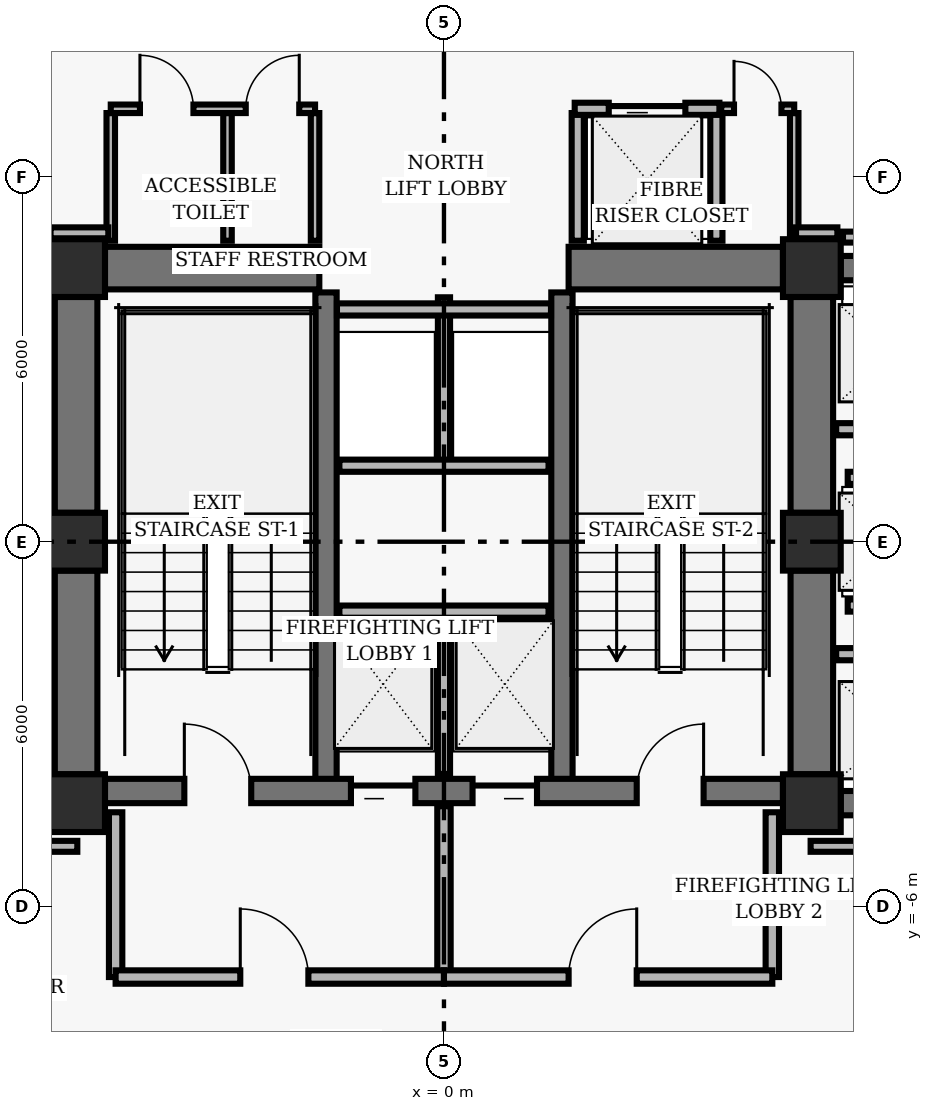
"""IFC4 building model, lengths in metres.
Left out: names, types, materials, properties, quantities, classifications, styles, units other than length and angle.
Written with IfcOpenShell. Run it as: python <this file> out.ifc"""

import sys

from ifc_helpers import new_model, si_unit, direction, frame, frame_2d, origin, origin_2d, place, context, subcontext, project, spatial, rectangle, hollow_rectangle, extrude, element, fill, save


model = new_model("IFC4")
c1 = context("Model", 3, precision=1e-05, world=origin(), true_north=direction((0.0, 1.0)))
c2 = subcontext(c1, "Body", "Model", "MODEL_VIEW")
j1 = project(units=[si_unit("LENGTHUNIT", "METRE"), si_unit("PLANEANGLEUNIT", "RADIAN")], contexts=[c1])
p1 = place(None, origin())
s1 = spatial("IfcSite", under=j1, at=p1, CompositionType="ELEMENT")
p2 = place(p1, origin())
s2 = spatial("IfcBuilding", under=s1, at=p2, CompositionType="ELEMENT")
p3 = place(p2, frame((0.0, 0.0, 97.76)))
s3 = spatial("IfcBuildingStorey", under=s2, at=p3, CompositionType="ELEMENT", Elevation=97.76)
for number, where, z_axis, x_axis in (
    (1, (-6.05, 4.5, 0.0), (0.0, 0.0, 1.0), (1.0, 0.0, 0.0)),
    (2, (6.05, 4.5, 0.0), (0.0, 0.0, 1.0), (1.0, 0.0, 0.0)),
    (3, (-6.05, 0.0, 0.0), (0.0, 0.0, 1.0), (1.0, 0.0, 0.0)),
    (4, (6.05, 0.0, 0.0), (0.0, 0.0, 1.0), (1.0, 0.0, 0.0)),
    (5, (-6.05, -4.3, 0.0), (0.0, 0.0, 1.0), (1.0, 0.0, 0.0)),
    (6, (6.05, -4.3, 0.0), (0.0, 0.0, 1.0), (1.0, 0.0, 0.0)),
):
    element("IfcColumn", number, at=place(p3, frame(where, z_axis=z_axis, x_axis=x_axis)), inside=s3, PredefinedType="COLUMN", context=c2, shape_type="SweptSolid", body=[
        extrude(hollow_rectangle(XDim=0.95, YDim=0.95, WallThickness=0.06, InnerFilletRadius=0.02, OuterFilletRadius=0.04, at=origin_2d()), origin(), (0.0, 0.0, 1.0), 3.04),
    ])
p4 = place(p3, frame((-6.05, 0.475, 0.0), z_axis=(0.0, 0.0, 1.0), x_axis=(0.0, 1.0, 0.0)))
e7 = element("IfcWall", 7, at=p4, inside=s3, PredefinedType="SHEAR", context=c2, shape_type="SweptSolid", body=[
    extrude(rectangle(XDim=3.55, YDim=0.7, at=frame_2d((1.775, 0.0))), origin(), (0.0, 0.0, 1.0), 2.718),
])
p5 = place(p3, frame((-6.05, -3.825, 0.0), z_axis=(0.0, 0.0, 1.0), x_axis=(0.0, 1.0, 0.0)))
e8 = element("IfcWall", 8, at=p5, inside=s3, PredefinedType="SHEAR", context=c2, shape_type="SweptSolid", body=[
    extrude(rectangle(XDim=3.35, YDim=0.7, at=frame_2d((1.675, 0.0))), origin(), (0.0, 0.0, 1.0), 2.718),
])
p6 = place(p3, frame((6.05, 0.475, 0.0), z_axis=(0.0, 0.0, 1.0), x_axis=(0.0, 1.0, 0.0)))
e9 = element("IfcWall", 9, at=p6, inside=s3, PredefinedType="SHEAR", context=c2, shape_type="SweptSolid", body=[
    extrude(rectangle(XDim=3.55, YDim=0.7, at=frame_2d((1.775, 0.0))), origin(), (0.0, 0.0, 1.0), 2.718),
])
p7 = place(p3, frame((6.05, -3.825, 0.0), z_axis=(0.0, 0.0, 1.0), x_axis=(0.0, 1.0, 0.0)))
e10 = element("IfcWall", 10, at=p7, inside=s3, PredefinedType="SHEAR", context=c2, shape_type="SweptSolid", body=[
    extrude(rectangle(XDim=3.35, YDim=0.7, at=frame_2d((1.675, 0.0))), origin(), (0.0, 0.0, 1.0), 2.718),
])
for number, where, z_axis, x_axis in (
    (11, (-1.94, -4.1, 0.0), (0.0, 0.0, 1.0), (0.0, 1.0, 0.0)),
    (12, (1.94, -4.1, 0.0), (0.0, 0.0, 1.0), (0.0, 1.0, 0.0)),
):
    element("IfcWall", number, at=place(p3, frame(where, z_axis=z_axis, x_axis=x_axis)), inside=s3, PredefinedType="SHEAR", context=c2, shape_type="SweptSolid", body=[
        extrude(rectangle(XDim=8.2, YDim=0.35, at=frame_2d((4.1, 0.0))), origin(), (0.0, 0.0, 1.0), 2.718),
    ])
p8 = place(p3, frame((-5.575, -4.1, 0.0), z_axis=(0.0, 0.0, 1.0), x_axis=(1.0, 0.0, 0.0)))
e13 = element("IfcWall", 13, at=p8, inside=s3, PredefinedType="SHEAR", context=c2, shape_type="SweptSolid", body=[
    extrude(rectangle(XDim=11.15, YDim=0.4, at=frame_2d((5.575, 0.0))), origin(), (0.0, 0.0, 1.0), 2.718),
])
p9 = place(p8, frame((1.305, 0.0, 0.0)))
e14 = element("IfcOpeningElement", 14, at=p9, cuts=e13, PredefinedType="OPENING", context=c2, shape_type="SweptSolid", body=[
    extrude(rectangle(XDim=1.1, YDim=2.04, at=frame_2d((0.55, 1.02))), frame((0.0, 0.21, 0.0), z_axis=(0.0, -1.0, 0.0), x_axis=(1.0, 0.0, 0.0)), (0.0, 0.0, 1.0), 0.42),
])
p10 = place(p8, frame((8.745, 0.0, 0.0)))
e15 = element("IfcOpeningElement", 15, at=p10, cuts=e13, PredefinedType="OPENING", context=c2, shape_type="SweptSolid", body=[
    extrude(rectangle(XDim=1.1, YDim=2.04, at=frame_2d((0.55, 1.02))), frame((0.0, 0.21, 0.0), z_axis=(0.0, -1.0, 0.0), x_axis=(1.0, 0.0, 0.0)), (0.0, 0.0, 1.0), 0.42),
])
p11 = place(p8, frame((4.045, 0.0, 0.0)))
e16 = element("IfcOpeningElement", 16, at=p11, cuts=e13, PredefinedType="OPENING", context=c2, shape_type="SweptSolid", body=[
    extrude(rectangle(XDim=1.06, YDim=2.04, at=frame_2d((0.53, 1.02))), frame((0.0, 0.21, 0.0), z_axis=(0.0, -1.0, 0.0), x_axis=(1.0, 0.0, 0.0)), (0.0, 0.0, 1.0), 0.42),
])
p12 = place(p8, frame((6.045, 0.0, 0.0)))
e17 = element("IfcOpeningElement", 17, at=p12, cuts=e13, PredefinedType="OPENING", context=c2, shape_type="SweptSolid", body=[
    extrude(rectangle(XDim=1.06, YDim=2.04, at=frame_2d((0.53, 1.02))), frame((0.0, 0.21, 0.0), z_axis=(0.0, -1.0, 0.0), x_axis=(1.0, 0.0, 0.0)), (0.0, 0.0, 1.0), 0.42),
])
for number, where, z_axis, x_axis in (
    (18, (-5.575, 4.5, 0.0), (0.0, 0.0, 1.0), (1.0, 0.0, 0.0)),
    (19, (2.05, 4.5, 0.0), (0.0, 0.0, 1.0), (1.0, 0.0, 0.0)),
):
    element("IfcWall", number, at=place(p3, frame(where, z_axis=z_axis, x_axis=x_axis)), inside=s3, PredefinedType="SHEAR", context=c2, shape_type="SweptSolid", body=[
        extrude(rectangle(XDim=3.525, YDim=0.7, at=frame_2d((1.762, 0.0))), origin(), (0.0, 0.0, 1.0), 2.718),
    ])
for number, where, z_axis, x_axis in (
    (20, (6.525, 4.5, 0.0), (0.0, 0.0, 1.0), (1.0, 0.0, 0.0)),
    (21, (6.525, -4.3, 0.0), (0.0, 0.0, 1.0), (1.0, 0.0, 0.0)),
):
    element("IfcWall", number, at=place(p3, frame(where, z_axis=z_axis, x_axis=x_axis)), inside=s3, PredefinedType="SHEAR", context=c2, shape_type="SweptSolid", body=[
        extrude(rectangle(XDim=1.95, YDim=0.4, at=frame_2d((0.975, 0.0))), origin(), (0.0, 0.0, 1.0), 2.718),
    ])
p13 = place(p3, frame((0.0, -3.82, 0.0), z_axis=(0.0, 0.0, 1.0), x_axis=(0.0, 1.0, 0.0)))
e22 = element("IfcWall", 22, at=p13, inside=s3, PredefinedType="PARTITIONING", context=c2, shape_type="SweptSolid", body=[
    extrude(rectangle(XDim=2.67, YDim=0.2, at=frame_2d((1.335, 0.0))), origin(), (0.0, 0.0, 1.0), 2.693),
])
p14 = place(p3, frame((-1.72, -1.15, 0.0), z_axis=(0.0, 0.0, 1.0), x_axis=(1.0, 0.0, 0.0)))
e23 = element("IfcWall", 23, at=p14, inside=s3, PredefinedType="PARTITIONING", context=c2, shape_type="SweptSolid", body=[
    extrude(rectangle(XDim=3.44, YDim=0.2, at=frame_2d((1.72, 0.0))), origin(), (0.0, 0.0, 1.0), 2.693),
])
for number, where, z_axis, x_axis in (
    (24, (-5.4, -7.16, 0.0), (0.0, 0.0, 1.0), (0.0, 1.0, 0.0)),
    (25, (5.4, -7.16, 0.0), (0.0, 0.0, 1.0), (0.0, 1.0, 0.0)),
):
    element("IfcWall", number, at=place(p3, frame(where, z_axis=z_axis, x_axis=x_axis)), inside=s3, PredefinedType="PARTITIONING", context=c2, shape_type="SweptSolid", body=[
        extrude(rectangle(XDim=2.71, YDim=0.22, at=frame_2d((1.355, 0.0))), origin(), (0.0, 0.0, 1.0), 2.693),
    ])
p15 = place(p3, frame((0.0, -7.16, 0.0), z_axis=(0.0, 0.0, 1.0), x_axis=(0.0, 1.0, 0.0)))
e26 = element("IfcWall", 26, at=p15, inside=s3, PredefinedType="PARTITIONING", context=c2, shape_type="SweptSolid", body=[
    extrude(rectangle(XDim=2.81, YDim=0.22, at=frame_2d((1.405, 0.0))), origin(), (0.0, 0.0, 1.0), 2.693),
])
p16 = place(p3, frame((-5.4, -7.16, 0.0), z_axis=(0.0, 0.0, 1.0), x_axis=(1.0, 0.0, 0.0)))
e27 = element("IfcWall", 27, at=p16, inside=s3, PredefinedType="PARTITIONING", context=c2, shape_type="SweptSolid", body=[
    extrude(rectangle(XDim=5.4, YDim=0.22, at=frame_2d((2.7, 0.0))), origin(), (0.0, 0.0, 1.0), 2.693),
])
p17 = place(p16, frame((2.05, 0.0, 0.0)))
e28 = element("IfcOpeningElement", 28, at=p17, cuts=e27, PredefinedType="OPENING", context=c2, shape_type="SweptSolid", body=[
    extrude(rectangle(XDim=1.12, YDim=2.02, at=frame_2d((0.56, 1.01))), frame((0.0, 0.12, 0.0), z_axis=(0.0, -1.0, 0.0), x_axis=(1.0, 0.0, 0.0)), (0.0, 0.0, 1.0), 0.24),
])
p18 = place(p3, frame((0.0, -7.16, 0.0), z_axis=(0.0, 0.0, 1.0), x_axis=(1.0, 0.0, 0.0)))
e29 = element("IfcWall", 29, at=p18, inside=s3, PredefinedType="PARTITIONING", context=c2, shape_type="SweptSolid", body=[
    extrude(rectangle(XDim=5.4, YDim=0.22, at=frame_2d((2.7, 0.0))), origin(), (0.0, 0.0, 1.0), 2.693),
])
p19 = place(p18, frame((2.05, 0.0, 0.0)))
e30 = element("IfcOpeningElement", 30, at=p19, cuts=e29, PredefinedType="OPENING", context=c2, shape_type="SweptSolid", body=[
    extrude(rectangle(XDim=1.12, YDim=2.02, at=frame_2d((0.56, 1.01))), frame((0.0, 0.12, 0.0), z_axis=(0.0, -1.0, 0.0), x_axis=(1.0, 0.0, 0.0)), (0.0, 0.0, 1.0), 0.24),
])
p20 = place(p3, frame((0.0, 1.25, 0.0), z_axis=(0.0, 0.0, 1.0), x_axis=(0.0, 1.0, 0.0)))
e31 = element("IfcWall", 31, at=p20, inside=s3, PredefinedType="PARTITIONING", context=c2, shape_type="SweptSolid", body=[
    extrude(rectangle(XDim=2.77, YDim=0.2, at=frame_2d((1.385, 0.0))), origin(), (0.0, 0.0, 1.0), 2.693),
])
p21 = place(p3, frame((-1.72, 1.25, 0.0), z_axis=(0.0, 0.0, 1.0), x_axis=(1.0, 0.0, 0.0)))
e32 = element("IfcWall", 32, at=p21, inside=s3, PredefinedType="PARTITIONING", context=c2, shape_type="SweptSolid", body=[
    extrude(rectangle(XDim=3.44, YDim=0.2, at=frame_2d((1.72, 0.0))), origin(), (0.0, 0.0, 1.0), 2.693),
])
p22 = place(p3, frame((-1.76, 3.82, 0.0), z_axis=(0.0, 0.0, 1.0), x_axis=(1.0, 0.0, 0.0)))
e33 = element("IfcWall", 33, at=p22, inside=s3, PredefinedType="PARTITIONING", context=c2, shape_type="SweptSolid", body=[
    extrude(rectangle(XDim=3.52, YDim=0.2, at=frame_2d((1.76, 0.0))), origin(), (0.0, 0.0, 1.0), 2.693),
])
for number, where, z_axis, x_axis in (
    (34, (2.2, 4.95, 0.0), (0.0, 0.0, 1.0), (0.0, 1.0, 0.0)),
    (35, (4.48, 4.95, 0.0), (0.0, 0.0, 1.0), (0.0, 1.0, 0.0)),
):
    element("IfcWall", number, at=place(p3, frame(where, z_axis=z_axis, x_axis=x_axis)), inside=s3, PredefinedType="PARTITIONING", context=c2, shape_type="SweptSolid", body=[
        extrude(rectangle(XDim=2.1, YDim=0.2, at=frame_2d((1.05, 0.0))), origin(), (0.0, 0.0, 1.0), 2.693),
    ])
p23 = place(p3, frame((2.15, 7.12, 0.0), z_axis=(0.0, 0.0, 1.0), x_axis=(1.0, 0.0, 0.0)))
e36 = element("IfcWall", 36, at=p23, inside=s3, PredefinedType="PARTITIONING", context=c2, shape_type="SweptSolid", body=[
    extrude(rectangle(XDim=2.38, YDim=0.2, at=frame_2d((1.19, 0.0))), origin(), (0.0, 0.0, 1.0), 2.693),
])
p24 = place(p23, frame((0.56, 0.0, 0.0)))
e37 = element("IfcOpeningElement", 37, at=p24, cuts=e36, PredefinedType="OPENING", context=c2, shape_type="SweptSolid", body=[
    extrude(rectangle(XDim=1.26, YDim=2.06, at=frame_2d((0.63, 1.03))), frame((0.0, 0.11, 0.0), z_axis=(0.0, -1.0, 0.0), x_axis=(1.0, 0.0, 0.0)), (0.0, 0.0, 1.0), 0.22),
])
for number, where, z_axis, x_axis in (
    (38, (-5.48, 4.95, 0.0), (0.0, 0.0, 1.0), (0.0, 1.0, 0.0)),
    (39, (-3.56, 4.95, 0.0), (0.0, 0.0, 1.0), (0.0, 1.0, 0.0)),
    (40, (-2.12, 4.95, 0.0), (0.0, 0.0, 1.0), (0.0, 1.0, 0.0)),
):
    element("IfcWall", number, at=place(p3, frame(where, z_axis=z_axis, x_axis=x_axis)), inside=s3, PredefinedType="PARTITIONING", context=c2, shape_type="SweptSolid", body=[
        extrude(rectangle(XDim=2.1, YDim=0.14, at=frame_2d((1.05, 0.0))), origin(), (0.0, 0.0, 1.0), 2.693),
    ])
p25 = place(p3, frame((-5.48, 7.12, 0.0), z_axis=(0.0, 0.0, 1.0), x_axis=(1.0, 0.0, 0.0)))
e41 = element("IfcWall", 41, at=p25, inside=s3, PredefinedType="PARTITIONING", context=c2, shape_type="SweptSolid", body=[
    extrude(rectangle(XDim=3.36, YDim=0.14, at=frame_2d((1.68, 0.0))), origin(), (0.0, 0.0, 1.0), 2.693),
])
p26 = place(p25, frame((0.48, 0.0, 0.0)))
e42 = element("IfcOpeningElement", 42, at=p26, cuts=e41, PredefinedType="OPENING", context=c2, shape_type="SweptSolid", body=[
    extrude(rectangle(XDim=0.88, YDim=2.02, at=frame_2d((0.44, 1.01))), frame((0.0, 0.08, 0.0), z_axis=(0.0, -1.0, 0.0), x_axis=(1.0, 0.0, 0.0)), (0.0, 0.0, 1.0), 0.16),
])
p27 = place(p25, frame((2.22, 0.0, 0.0)))
e43 = element("IfcOpeningElement", 43, at=p27, cuts=e41, PredefinedType="OPENING", context=c2, shape_type="SweptSolid", body=[
    extrude(rectangle(XDim=0.88, YDim=2.02, at=frame_2d((0.44, 1.01))), frame((0.0, 0.08, 0.0), z_axis=(0.0, -1.0, 0.0), x_axis=(1.0, 0.0, 0.0)), (0.0, 0.0, 1.0), 0.16),
])
p28 = place(p3, frame((5.76, 4.95, 0.0), z_axis=(0.0, 0.0, 1.0), x_axis=(0.0, 1.0, 0.0)))
e44 = element("IfcWall", 44, at=p28, inside=s3, PredefinedType="PARTITIONING", context=c2, shape_type="SweptSolid", body=[
    extrude(rectangle(XDim=2.1, YDim=0.14, at=frame_2d((1.05, 0.0))), origin(), (0.0, 0.0, 1.0), 2.693),
])
p29 = place(p3, frame((4.56, 7.12, 0.0), z_axis=(0.0, 0.0, 1.0), x_axis=(1.0, 0.0, 0.0)))
e45 = element("IfcWall", 45, at=p29, inside=s3, PredefinedType="PARTITIONING", context=c2, shape_type="SweptSolid", body=[
    extrude(rectangle(XDim=1.2, YDim=0.14, at=frame_2d((0.6, 0.0))), origin(), (0.0, 0.0, 1.0), 2.693),
])
p30 = place(p29, frame((0.21, 0.0, 0.0)))
e46 = element("IfcOpeningElement", 46, at=p30, cuts=e45, PredefinedType="OPENING", context=c2, shape_type="SweptSolid", body=[
    extrude(rectangle(XDim=0.78, YDim=2.01, at=frame_2d((0.39, 1.005))), frame((0.0, 0.08, 0.0), z_axis=(0.0, -1.0, 0.0), x_axis=(1.0, 0.0, 0.0)), (0.0, 0.0, 1.0), 0.16),
])
for number, where, z_axis, x_axis in (
    (47, (6.45, -1.85, 0.0), (0.0, 0.0, 1.0), (1.0, 0.0, 0.0)),
    (48, (6.45, 1.85, 0.0), (0.0, 0.0, 1.0), (1.0, 0.0, 0.0)),
):
    element("IfcWall", number, at=place(p3, frame(where, z_axis=z_axis, x_axis=x_axis)), inside=s3, PredefinedType="PARTITIONING", context=c2, shape_type="SweptSolid", body=[
        extrude(rectangle(XDim=2.1, YDim=0.2, at=frame_2d((1.05, 0.0))), origin(), (0.0, 0.0, 1.0), 2.693),
    ])
for number, where, z_axis, x_axis in (
    (49, (6.64, -1.05, 0.0), (0.0, 0.0, 1.0), (1.0, 0.0, 0.0)),
    (50, (6.64, 1.05, 0.0), (0.0, 0.0, 1.0), (1.0, 0.0, 0.0)),
):
    element("IfcWall", number, at=place(p3, frame(where, z_axis=z_axis, x_axis=x_axis)), inside=s3, PredefinedType="PARTITIONING", context=c2, shape_type="SweptSolid", body=[
        extrude(rectangle(XDim=1.91, YDim=0.2, at=frame_2d((0.955, 0.0))), origin(), (0.0, 0.0, 1.0), 2.693),
    ])
for number, where, z_axis, x_axis in (
    (51, (-9.37, -5.01, 0.0), (0.0, 0.0, 1.0), (1.0, 0.0, 0.0)),
    (52, (6.03, -5.01, 0.0), (0.0, 0.0, 1.0), (1.0, 0.0, 0.0)),
):
    element("IfcWall", number, at=place(p3, frame(where, z_axis=z_axis, x_axis=x_axis)), inside=s3, PredefinedType="PARTITIONING", context=c2, shape_type="SweptSolid", body=[
        extrude(rectangle(XDim=3.34, YDim=0.18, at=frame_2d((1.67, 0.0))), origin(), (0.0, 0.0, 1.0), 2.693),
    ])
p31 = place(p3, frame((9.37, 5.01, 0.0), z_axis=(0.0, 0.0, 1.0), x_axis=(-1.0, 0.0, 0.0)))
e53 = element("IfcWall", 53, at=p31, inside=s3, PredefinedType="PARTITIONING", context=c2, shape_type="SweptSolid", body=[
    extrude(rectangle(XDim=2.808, YDim=0.18, at=frame_2d((1.404, 0.0))), origin(), (0.0, 0.0, 1.0), 2.693),
])
p32 = place(p3, frame((6.47, 5.08, 0.0), z_axis=(0.0, 0.0, 1.0), x_axis=(-1.0, 0.0, 0.0)))
e54 = element("IfcWall", 54, at=p32, inside=s3, PredefinedType="PARTITIONING", context=c2, shape_type="SweptSolid", body=[
    extrude(rectangle(XDim=0.68, YDim=0.18, at=frame_2d((0.34, 0.0))), origin(), (0.0, 0.0, 1.0), 2.693),
])
p33 = place(p3, frame((-5.52, 5.08, 0.0), z_axis=(0.0, 0.0, 1.0), x_axis=(-1.0, 0.0, 0.0)))
e55 = element("IfcWall", 55, at=p33, inside=s3, PredefinedType="PARTITIONING", context=c2, shape_type="SweptSolid", body=[
    extrude(rectangle(XDim=0.95, YDim=0.18, at=frame_2d((0.475, 0.0))), origin(), (0.0, 0.0, 1.0), 2.693),
])
p34 = place(p9, origin())
e56 = element("IfcDoor", 56, at=p34, inside=s3, OperationType="SINGLE_SWING_LEFT", PredefinedType="DOOR", context=c2, shape_type="SweptSolid", body=[
    extrude(rectangle(XDim=1.1, YDim=2.04, at=frame_2d((0.55, 1.02))), frame((0.0, 0.025, 0.0), z_axis=(0.0, -1.0, 0.0), x_axis=(1.0, 0.0, 0.0)), (0.0, 0.0, 1.0), 0.05),
])
fill(e14, e56)
p35 = place(p10, origin())
e57 = element("IfcDoor", 57, at=p35, inside=s3, OperationType="SINGLE_SWING_RIGHT", PredefinedType="DOOR", context=c2, shape_type="SweptSolid", body=[
    extrude(rectangle(XDim=1.1, YDim=2.04, at=frame_2d((0.55, 1.02))), frame((0.0, 0.025, 0.0), z_axis=(0.0, -1.0, 0.0), x_axis=(1.0, 0.0, 0.0)), (0.0, 0.0, 1.0), 0.05),
])
fill(e15, e57)
p36 = place(p11, origin())
e58 = element("IfcDoor", 58, at=p36, inside=s3, OperationType="SLIDING_TO_LEFT", PredefinedType="DOOR", context=c2, shape_type="SweptSolid", body=[
    extrude(rectangle(XDim=1.06, YDim=2.04, at=frame_2d((0.53, 1.02))), frame((0.0, 0.025, 0.0), z_axis=(0.0, -1.0, 0.0), x_axis=(1.0, 0.0, 0.0)), (0.0, 0.0, 1.0), 0.05),
])
fill(e16, e58)
p37 = place(p12, origin())
e59 = element("IfcDoor", 59, at=p37, inside=s3, OperationType="SLIDING_TO_RIGHT", PredefinedType="DOOR", context=c2, shape_type="SweptSolid", body=[
    extrude(rectangle(XDim=1.06, YDim=2.04, at=frame_2d((0.53, 1.02))), frame((0.0, 0.025, 0.0), z_axis=(0.0, -1.0, 0.0), x_axis=(1.0, 0.0, 0.0)), (0.0, 0.0, 1.0), 0.05),
])
fill(e17, e59)
p38 = place(p17, origin())
e60 = element("IfcDoor", 60, at=p38, inside=s3, OperationType="SINGLE_SWING_LEFT", PredefinedType="DOOR", context=c2, shape_type="SweptSolid", body=[
    extrude(rectangle(XDim=1.12, YDim=2.02, at=frame_2d((0.56, 1.01))), frame((0.0, 0.025, 0.0), z_axis=(0.0, -1.0, 0.0), x_axis=(1.0, 0.0, 0.0)), (0.0, 0.0, 1.0), 0.05),
])
fill(e28, e60)
p39 = place(p19, origin())
e61 = element("IfcDoor", 61, at=p39, inside=s3, OperationType="SINGLE_SWING_RIGHT", PredefinedType="DOOR", context=c2, shape_type="SweptSolid", body=[
    extrude(rectangle(XDim=1.12, YDim=2.02, at=frame_2d((0.56, 1.01))), frame((0.0, 0.025, 0.0), z_axis=(0.0, -1.0, 0.0), x_axis=(1.0, 0.0, 0.0)), (0.0, 0.0, 1.0), 0.05),
])
fill(e30, e61)
p40 = place(p24, origin())
e62 = element("IfcDoor", 62, at=p40, inside=s3, OperationType="SLIDING_TO_LEFT", PredefinedType="DOOR", context=c2, shape_type="SweptSolid", body=[
    extrude(rectangle(XDim=1.26, YDim=2.06, at=frame_2d((0.63, 1.03))), frame((0.0, 0.025, 0.0), z_axis=(0.0, -1.0, 0.0), x_axis=(1.0, 0.0, 0.0)), (0.0, 0.0, 1.0), 0.05),
])
fill(e37, e62)
p41 = place(p26, origin())
e63 = element("IfcDoor", 63, at=p41, inside=s3, OperationType="SINGLE_SWING_LEFT", PredefinedType="DOOR", context=c2, shape_type="SweptSolid", body=[
    extrude(rectangle(XDim=0.88, YDim=2.02, at=frame_2d((0.44, 1.01))), frame((0.0, 0.025, 0.0), z_axis=(0.0, -1.0, 0.0), x_axis=(1.0, 0.0, 0.0)), (0.0, 0.0, 1.0), 0.05),
])
fill(e42, e63)
p42 = place(p27, origin())
e64 = element("IfcDoor", 64, at=p42, inside=s3, OperationType="SINGLE_SWING_RIGHT", PredefinedType="DOOR", context=c2, shape_type="SweptSolid", body=[
    extrude(rectangle(XDim=0.88, YDim=2.02, at=frame_2d((0.44, 1.01))), frame((0.0, 0.025, 0.0), z_axis=(0.0, -1.0, 0.0), x_axis=(1.0, 0.0, 0.0)), (0.0, 0.0, 1.0), 0.05),
])
fill(e43, e64)
p43 = place(p30, origin())
e65 = element("IfcDoor", 65, at=p43, inside=s3, OperationType="SINGLE_SWING_LEFT", PredefinedType="DOOR", context=c2, shape_type="SweptSolid", body=[
    extrude(rectangle(XDim=0.78, YDim=2.01, at=frame_2d((0.39, 1.005))), frame((0.0, 0.025, 0.0), z_axis=(0.0, -1.0, 0.0), x_axis=(1.0, 0.0, 0.0)), (0.0, 0.0, 1.0), 0.05),
])
fill(e46, e65)
save(model, sys.argv[1])
